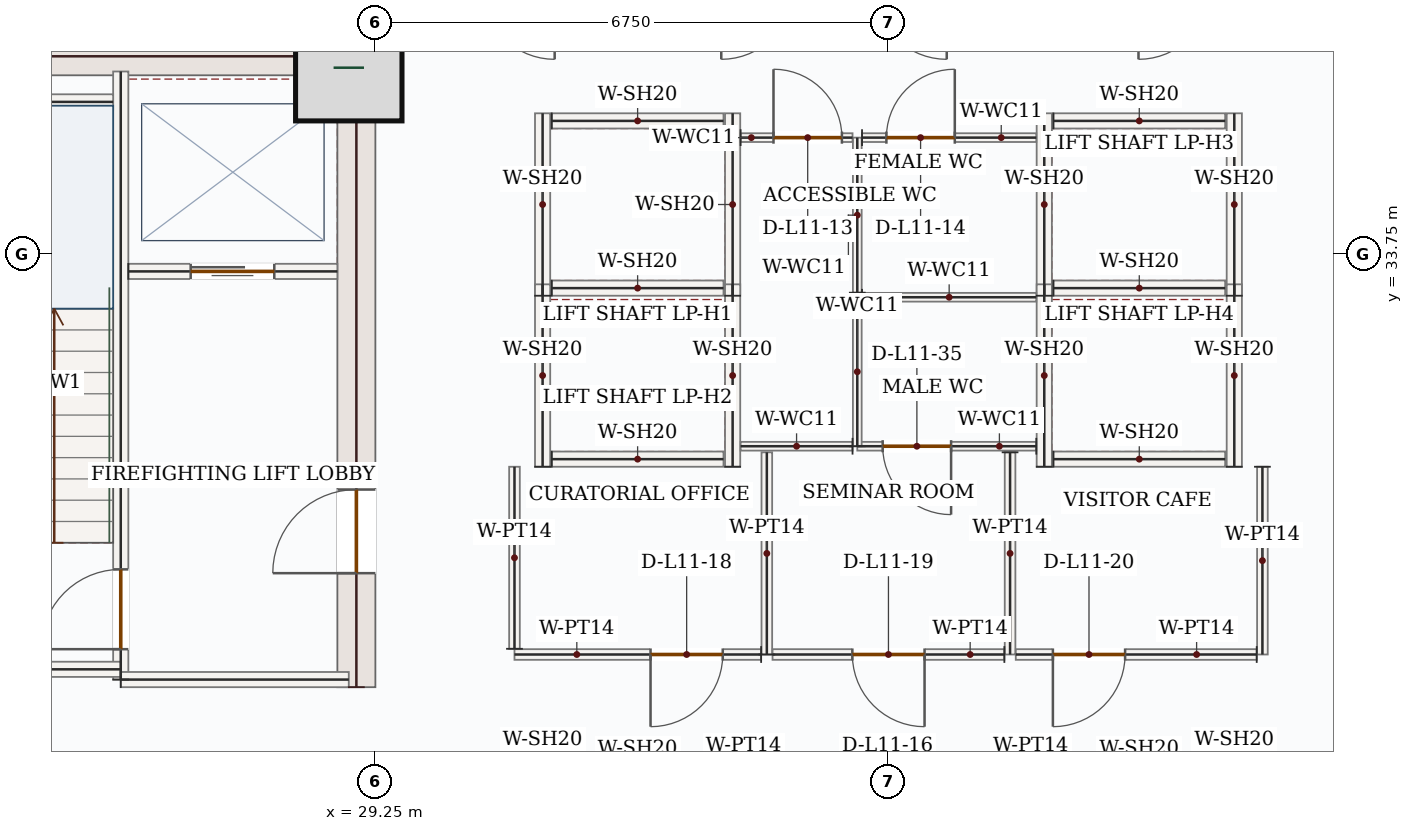
"""IFC4 building model, lengths in metres.
Left out: names, types, materials, properties, quantities, classifications, styles, units other than length and angle.
Written with IfcOpenShell. Run it as: python <this file> out.ifc"""

import sys

from ifc_helpers import new_model, si_unit, direction, frame, frame_2d, origin, origin_2d, place, context, subcontext, project, spatial, rectangle, extrude, source, transform, mapped, element, fill, save


model = new_model("IFC4")
c1 = context("Model", 3, precision=1e-05, world=origin(), true_north=direction((0.0, 1.0)))
c2 = subcontext(c1, "Body", "Model", "MODEL_VIEW")
j1 = project(units=[si_unit("LENGTHUNIT", "METRE"), si_unit("PLANEANGLEUNIT", "RADIAN")], contexts=[c1])
p1 = place(None, origin())
s1 = spatial("IfcSite", under=j1, at=p1, CompositionType="ELEMENT")
p2 = place(p1, origin())
s2 = spatial("IfcBuilding", under=s1, at=p2, CompositionType="ELEMENT")
p3 = place(p2, frame((0.0, 0.0, 54.3)))
s3 = spatial("IfcBuildingStorey", under=s2, at=p3, CompositionType="ELEMENT", Elevation=54.3)
p4 = place(p3, frame((29.0, 28.05, 0.0), z_axis=(0.0, 0.0, 1.0), x_axis=(0.0, 1.0, 0.0)))
e1 = element("IfcWall", 1, at=p4, inside=s3, PredefinedType="SHEAR", context=c2, shape_type="SweptSolid", body=[
    extrude(rectangle(XDim=8.55, YDim=0.5, at=frame_2d((4.275, 0.0))), origin(), (0.0, 0.0, 1.0), 3.95),
])
p5 = place(p4, frame((1.5, 0.0, 0.0)))
e2 = element("IfcOpeningElement", 2, at=p5, cuts=e1, PredefinedType="OPENING", context=c2, shape_type="SweptSolid", body=[
    extrude(rectangle(XDim=1.1, YDim=2.2, at=frame_2d((0.55, 1.1))), frame((0.0, 0.26, 0.0), z_axis=(0.0, -1.0, 0.0), x_axis=(1.0, 0.0, 0.0)), (0.0, 0.0, 1.0), 0.52),
])
m1 = source(origin(), c2, "Body", "SweptSolid", [
    extrude(rectangle(XDim=7.0, YDim=0.5, at=frame_2d((3.5, 0.0))), origin(), (0.0, 0.0, 1.0), 3.95),
])
p6 = place(p3, frame((21.75, 36.35, 0.0), z_axis=(0.0, 0.0, 1.0), x_axis=(1.0, 0.0, 0.0)))
e3 = element("IfcWall", 3, at=p6, inside=s3, PredefinedType="SHEAR", context=c2, shape_type="MappedRepresentation", body=[
    mapped(m1, transform((0.0, 0.0, 0.0), x_axis=(1.0, 0.0, 0.0), y_axis=(0.0, 1.0, 0.0), z_axis=(0.0, 0.0, 1.0), scale=1.0)),
])
m2 = source(origin(), c2, "Body", "SweptSolid", [
    extrude(rectangle(XDim=1.4, YDim=1.4, at=origin_2d()), origin(), (0.0, 0.0, 1.0), 4.2),
])
p7 = place(p3, frame((28.9, 36.2, 0.0), z_axis=(0.0, 0.0, 1.0), x_axis=(1.0, 0.0, 0.0)))
e4 = element("IfcColumn", 4, at=p7, inside=s3, PredefinedType="COLUMN", context=c2, shape_type="MappedRepresentation", body=[
    mapped(m2, transform((0.0, 0.0, 0.0), x_axis=(1.0, 0.0, 0.0), y_axis=(0.0, 1.0, 0.0), z_axis=(0.0, 0.0, 1.0), scale=1.0)),
])
p8 = place(p3, frame((25.9, 28.15, 0.0), z_axis=(0.0, 0.0, 1.0), x_axis=(0.0, 1.0, 0.0)))
e5 = element("IfcWall", 5, at=p8, inside=s3, PredefinedType="SOLIDWALL", context=c2, shape_type="SweptSolid", body=[
    extrude(rectangle(XDim=8.0, YDim=0.2, at=frame_2d((4.0, 0.0))), origin(), (0.0, 0.0, 1.0), 3.95),
])
p9 = place(p8, frame((0.4, 0.0, 0.0)))
e6 = element("IfcOpeningElement", 6, at=p9, cuts=e5, PredefinedType="OPENING", context=c2, shape_type="SweptSolid", body=[
    extrude(rectangle(XDim=1.05, YDim=2.15, at=frame_2d((0.525, 1.075))), frame((0.0, 0.11, 0.0), z_axis=(0.0, -1.0, 0.0), x_axis=(1.0, 0.0, 0.0)), (0.0, 0.0, 1.0), 0.22),
])
m3 = source(origin(), c2, "Body", "SweptSolid", [
    extrude(rectangle(XDim=4.25, YDim=0.2, at=frame_2d((2.125, 0.0))), origin(), (0.0, 0.0, 1.0), 3.95),
])
p10 = place(p3, frame((21.65, 28.285, 0.0), z_axis=(0.0, 0.0, 1.0), x_axis=(1.0, 0.0, 0.0)))
e7 = element("IfcWall", 7, at=p10, inside=s3, PredefinedType="SOLIDWALL", context=c2, shape_type="MappedRepresentation", body=[
    mapped(m3, transform((0.0, 0.0, 0.0), x_axis=(1.0, 0.0, 0.0), y_axis=(0.0, 1.0, 0.0), z_axis=(0.0, 0.0, 1.0), scale=1.0)),
])
m4 = source(origin(), c2, "Body", "SweptSolid", [
    extrude(rectangle(XDim=3.0, YDim=0.2, at=frame_2d((1.5, 0.0))), origin(), (0.0, 0.0, 1.0), 3.95),
])
p11 = place(p3, frame((25.9, 28.15, 0.0), z_axis=(0.0, 0.0, 1.0), x_axis=(1.0, 0.0, 0.0)))
e8 = element("IfcWall", 8, at=p11, inside=s3, PredefinedType="SOLIDWALL", context=c2, shape_type="MappedRepresentation", body=[
    mapped(m4, transform((0.0, 0.0, 0.0), x_axis=(1.0, 0.0, 0.0), y_axis=(0.0, 1.0, 0.0), z_axis=(0.0, 0.0, 1.0), scale=1.0)),
])
m5 = source(origin(), c2, "Body", "SweptSolid", [
    extrude(rectangle(XDim=3.25, YDim=0.2, at=frame_2d((1.625, 0.0))), origin(), (0.0, 0.0, 1.0), 3.95),
])
p12 = place(p3, frame((22.55, 35.75, 0.0), z_axis=(0.0, 0.0, 1.0), x_axis=(1.0, 0.0, 0.0)))
e9 = element("IfcWall", 9, at=p12, inside=s3, PredefinedType="SOLIDWALL", context=c2, shape_type="MappedRepresentation", body=[
    mapped(m5, transform((0.0, 0.0, 0.0), x_axis=(1.0, 0.0, 0.0), y_axis=(0.0, 1.0, 0.0), z_axis=(0.0, 0.0, 1.0), scale=1.0)),
])
p13 = place(p3, frame((26.0, 33.52, 0.0), z_axis=(0.0, 0.0, 1.0), x_axis=(1.0, 0.0, 0.0)))
e10 = element("IfcWall", 10, at=p13, inside=s3, PredefinedType="SOLIDWALL", context=c2, shape_type="SweptSolid", body=[
    extrude(rectangle(XDim=2.75, YDim=0.2, at=frame_2d((1.375, 0.0))), origin(), (0.0, 0.0, 1.0), 3.95),
])
p14 = place(p13, frame((0.82, 0.0, 0.0)))
e11 = element("IfcOpeningElement", 11, at=p14, cuts=e10, PredefinedType="OPENING", context=c2, shape_type="SweptSolid", body=[
    extrude(rectangle(XDim=1.1, YDim=2.15, at=frame_2d((0.55, 1.075))), frame((0.0, 0.11, 0.0), z_axis=(0.0, -1.0, 0.0), x_axis=(1.0, 0.0, 0.0)), (0.0, 0.0, 1.0), 0.22),
])
m6 = source(origin(), c2, "Body", "SweptSolid", [
    extrude(rectangle(XDim=2.4, YDim=0.2, at=frame_2d((1.2, 0.0))), origin(), (0.0, 0.0, 1.0), 3.95),
])
for number, where, z_axis, x_axis in (
    (12, (31.45, 33.2, 0.0), (0.0, 0.0, 1.0), (0.0, 1.0, 0.0)),
    (13, (33.95, 33.2, 0.0), (0.0, 0.0, 1.0), (0.0, 1.0, 0.0)),
):
    element("IfcWall", number, at=place(p3, frame(where, z_axis=z_axis, x_axis=x_axis)), inside=s3, PredefinedType="SOLIDWALL", context=c2, shape_type="MappedRepresentation", body=[
        mapped(m6, transform((0.0, 0.0, 0.0), x_axis=(1.0, 0.0, 0.0), y_axis=(0.0, 1.0, 0.0), z_axis=(0.0, 0.0, 1.0), scale=1.0)),
    ])
m7 = source(origin(), c2, "Body", "SweptSolid", [
    extrude(rectangle(XDim=2.26, YDim=0.2, at=frame_2d((1.13, 0.0))), origin(), (0.0, 0.0, 1.0), 3.95),
])
for number, where, z_axis, x_axis in (
    (14, (31.57, 33.3, 0.0), (0.0, 0.0, 1.0), (1.0, 0.0, 0.0)),
    (15, (31.57, 35.5, 0.0), (0.0, 0.0, 1.0), (1.0, 0.0, 0.0)),
):
    element("IfcWall", number, at=place(p3, frame(where, z_axis=z_axis, x_axis=x_axis)), inside=s3, PredefinedType="SOLIDWALL", context=c2, shape_type="MappedRepresentation", body=[
        mapped(m7, transform((0.0, 0.0, 0.0), x_axis=(1.0, 0.0, 0.0), y_axis=(0.0, 1.0, 0.0), z_axis=(0.0, 0.0, 1.0), scale=1.0)),
    ])
for number, where, z_axis, x_axis in (
    (16, (31.45, 30.95, 0.0), (0.0, 0.0, 1.0), (0.0, 1.0, 0.0)),
    (17, (33.95, 30.95, 0.0), (0.0, 0.0, 1.0), (0.0, 1.0, 0.0)),
):
    element("IfcWall", number, at=place(p3, frame(where, z_axis=z_axis, x_axis=x_axis)), inside=s3, PredefinedType="SOLIDWALL", context=c2, shape_type="MappedRepresentation", body=[
        mapped(m6, transform((0.0, 0.0, 0.0), x_axis=(1.0, 0.0, 0.0), y_axis=(0.0, 1.0, 0.0), z_axis=(0.0, 0.0, 1.0), scale=1.0)),
    ])
p15 = place(p3, frame((31.57, 31.05, 0.0), z_axis=(0.0, 0.0, 1.0), x_axis=(1.0, 0.0, 0.0)))
e18 = element("IfcWall", 18, at=p15, inside=s3, PredefinedType="SOLIDWALL", context=c2, shape_type="MappedRepresentation", body=[
    mapped(m7, transform((0.0, 0.0, 0.0), x_axis=(1.0, 0.0, 0.0), y_axis=(0.0, 1.0, 0.0), z_axis=(0.0, 0.0, 1.0), scale=1.0)),
])
for number, where, z_axis, x_axis in (
    (19, (38.05, 33.2, 0.0), (0.0, 0.0, 1.0), (0.0, 1.0, 0.0)),
    (20, (40.55, 33.2, 0.0), (0.0, 0.0, 1.0), (0.0, 1.0, 0.0)),
):
    element("IfcWall", number, at=place(p3, frame(where, z_axis=z_axis, x_axis=x_axis)), inside=s3, PredefinedType="SOLIDWALL", context=c2, shape_type="MappedRepresentation", body=[
        mapped(m6, transform((0.0, 0.0, 0.0), x_axis=(1.0, 0.0, 0.0), y_axis=(0.0, 1.0, 0.0), z_axis=(0.0, 0.0, 1.0), scale=1.0)),
    ])
for number, where, z_axis, x_axis in (
    (21, (38.17, 33.3, 0.0), (0.0, 0.0, 1.0), (1.0, 0.0, 0.0)),
    (22, (38.17, 35.5, 0.0), (0.0, 0.0, 1.0), (1.0, 0.0, 0.0)),
):
    element("IfcWall", number, at=place(p3, frame(where, z_axis=z_axis, x_axis=x_axis)), inside=s3, PredefinedType="SOLIDWALL", context=c2, shape_type="MappedRepresentation", body=[
        mapped(m7, transform((0.0, 0.0, 0.0), x_axis=(1.0, 0.0, 0.0), y_axis=(0.0, 1.0, 0.0), z_axis=(0.0, 0.0, 1.0), scale=1.0)),
    ])
for number, where, z_axis, x_axis in (
    (23, (38.05, 30.95, 0.0), (0.0, 0.0, 1.0), (0.0, 1.0, 0.0)),
    (24, (40.55, 30.95, 0.0), (0.0, 0.0, 1.0), (0.0, 1.0, 0.0)),
):
    element("IfcWall", number, at=place(p3, frame(where, z_axis=z_axis, x_axis=x_axis)), inside=s3, PredefinedType="SOLIDWALL", context=c2, shape_type="MappedRepresentation", body=[
        mapped(m6, transform((0.0, 0.0, 0.0), x_axis=(1.0, 0.0, 0.0), y_axis=(0.0, 1.0, 0.0), z_axis=(0.0, 0.0, 1.0), scale=1.0)),
    ])
p16 = place(p3, frame((38.17, 31.05, 0.0), z_axis=(0.0, 0.0, 1.0), x_axis=(1.0, 0.0, 0.0)))
e25 = element("IfcWall", 25, at=p16, inside=s3, PredefinedType="SOLIDWALL", context=c2, shape_type="MappedRepresentation", body=[
    mapped(m7, transform((0.0, 0.0, 0.0), x_axis=(1.0, 0.0, 0.0), y_axis=(0.0, 1.0, 0.0), z_axis=(0.0, 0.0, 1.0), scale=1.0)),
])
p17 = place(p3, frame((37.945, 31.22, 0.0), z_axis=(0.0, 0.0, 1.0), x_axis=(-1.0, 0.0, 0.0)))
e26 = element("IfcWall", 26, at=p17, inside=s3, PredefinedType="PARTITIONING", context=c2, shape_type="SweptSolid", body=[
    extrude(rectangle(XDim=2.355, YDim=0.115, at=frame_2d((1.177, 0.0))), origin(), (0.0, 0.0, 1.0), 3.95),
])
p18 = place(p17, frame((1.121, 0.0, 0.0)))
e27 = element("IfcOpeningElement", 27, at=p18, cuts=e26, PredefinedType="OPENING", context=c2, shape_type="SweptSolid", body=[
    extrude(rectangle(XDim=0.9, YDim=2.1, at=frame_2d((0.45, 1.05))), frame((0.0, 0.067, 0.0), z_axis=(0.0, -1.0, 0.0), x_axis=(1.0, 0.0, 0.0)), (0.0, 0.0, 1.0), 0.135),
])
m8 = source(origin(), c2, "Body", "SweptSolid", [
    extrude(rectangle(XDim=1.96, YDim=0.115, at=frame_2d((0.98, 0.0))), origin(), (0.0, 0.0, 1.0), 3.95),
])
p19 = place(p3, frame((35.59, 31.22, 0.0), z_axis=(0.0, 0.0, 1.0), x_axis=(0.0, 1.0, 0.0)))
e28 = element("IfcWall", 28, at=p19, inside=s3, PredefinedType="PARTITIONING", context=c2, shape_type="MappedRepresentation", body=[
    mapped(m8, transform((0.0, 0.0, 0.0), x_axis=(1.0, 0.0, 0.0), y_axis=(0.0, 1.0, 0.0), z_axis=(0.0, 0.0, 1.0), scale=1.0)),
])
m9 = source(origin(), c2, "Body", "SweptSolid", [
    extrude(rectangle(XDim=2.292, YDim=0.115, at=frame_2d((1.146, 0.0))), origin(), (0.0, 0.0, 1.0), 3.95),
])
p20 = place(p3, frame((35.653, 33.18, 0.0), z_axis=(0.0, 0.0, 1.0), x_axis=(1.0, 0.0, 0.0)))
e29 = element("IfcWall", 29, at=p20, inside=s3, PredefinedType="PARTITIONING", context=c2, shape_type="MappedRepresentation", body=[
    mapped(m9, transform((0.0, 0.0, 0.0), x_axis=(1.0, 0.0, 0.0), y_axis=(0.0, 1.0, 0.0), z_axis=(0.0, 0.0, 1.0), scale=1.0)),
])
m10 = source(origin(), c2, "Body", "SweptSolid", [
    extrude(rectangle(XDim=2.04, YDim=0.115, at=frame_2d((1.02, 0.0))), origin(), (0.0, 0.0, 1.0), 3.95),
])
p21 = place(p3, frame((35.59, 33.24, 0.0), z_axis=(0.0, 0.0, 1.0), x_axis=(0.0, 1.0, 0.0)))
e30 = element("IfcWall", 30, at=p21, inside=s3, PredefinedType="PARTITIONING", context=c2, shape_type="MappedRepresentation", body=[
    mapped(m10, transform((0.0, 0.0, 0.0), x_axis=(1.0, 0.0, 0.0), y_axis=(0.0, 1.0, 0.0), z_axis=(0.0, 0.0, 1.0), scale=1.0)),
])
p22 = place(p3, frame((35.653, 35.28, 0.0), z_axis=(0.0, 0.0, 1.0), x_axis=(1.0, 0.0, 0.0)))
e31 = element("IfcWall", 31, at=p22, inside=s3, PredefinedType="PARTITIONING", context=c2, shape_type="SweptSolid", body=[
    extrude(rectangle(XDim=2.292, YDim=0.115, at=frame_2d((1.146, 0.0))), origin(), (0.0, 0.0, 1.0), 3.95),
])
p23 = place(p22, frame((0.32, 0.0, 0.0)))
e32 = element("IfcOpeningElement", 32, at=p23, cuts=e31, PredefinedType="OPENING", context=c2, shape_type="SweptSolid", body=[
    extrude(rectangle(XDim=0.9, YDim=2.1, at=frame_2d((0.45, 1.05))), frame((0.0, 0.067, 0.0), z_axis=(0.0, -1.0, 0.0), x_axis=(1.0, 0.0, 0.0)), (0.0, 0.0, 1.0), 0.135),
])
m11 = source(origin(), c2, "Body", "SweptSolid", [
    extrude(rectangle(XDim=1.473, YDim=0.115, at=frame_2d((0.736, 0.0))), origin(), (0.0, 0.0, 1.0), 3.95),
])
p24 = place(p3, frame((35.528, 31.22, 0.0), z_axis=(0.0, 0.0, 1.0), x_axis=(-1.0, 0.0, 0.0)))
e33 = element("IfcWall", 33, at=p24, inside=s3, PredefinedType="PARTITIONING", context=c2, shape_type="MappedRepresentation", body=[
    mapped(m11, transform((0.0, 0.0, 0.0), x_axis=(1.0, 0.0, 0.0), y_axis=(0.0, 1.0, 0.0), z_axis=(0.0, 0.0, 1.0), scale=1.0)),
])
p25 = place(p3, frame((34.055, 35.28, 0.0), z_axis=(0.0, 0.0, 1.0), x_axis=(1.0, 0.0, 0.0)))
e34 = element("IfcWall", 34, at=p25, inside=s3, PredefinedType="PARTITIONING", context=c2, shape_type="SweptSolid", body=[
    extrude(rectangle(XDim=1.473, YDim=0.115, at=frame_2d((0.736, 0.0))), origin(), (0.0, 0.0, 1.0), 3.95),
])
p26 = place(p25, frame((0.433, 0.0, 0.0)))
e35 = element("IfcOpeningElement", 35, at=p26, cuts=e34, PredefinedType="OPENING", context=c2, shape_type="SweptSolid", body=[
    extrude(rectangle(XDim=0.9, YDim=2.1, at=frame_2d((0.45, 1.05))), frame((0.0, 0.067, 0.0), z_axis=(0.0, -1.0, 0.0), x_axis=(1.0, 0.0, 0.0)), (0.0, 0.0, 1.0), 0.135),
])
m12 = source(origin(), c2, "Body", "SweptSolid", [
    extrude(rectangle(XDim=2.66, YDim=0.14, at=frame_2d((1.33, 0.0))), origin(), (0.0, 0.0, 1.0), 3.95),
])
for number, where, z_axis, x_axis in (
    (36, (34.4, 28.48, 0.0), (0.0, 0.0, 1.0), (0.0, 1.0, 0.0)),
    (37, (37.6, 31.14, 0.0), (0.0, 0.0, 1.0), (0.0, -1.0, 0.0)),
):
    element("IfcWall", number, at=place(p3, frame(where, z_axis=z_axis, x_axis=x_axis)), inside=s3, PredefinedType="PARTITIONING", context=c2, shape_type="MappedRepresentation", body=[
        mapped(m12, transform((0.0, 0.0, 0.0), x_axis=(1.0, 0.0, 0.0), y_axis=(0.0, 1.0, 0.0), z_axis=(0.0, 0.0, 1.0), scale=1.0)),
    ])
p27 = place(p3, frame((37.525, 28.48, 0.0), z_axis=(0.0, 0.0, 1.0), x_axis=(-1.0, 0.0, 0.0)))
e38 = element("IfcWall", 38, at=p27, inside=s3, PredefinedType="PARTITIONING", context=c2, shape_type="SweptSolid", body=[
    extrude(rectangle(XDim=3.05, YDim=0.14, at=frame_2d((1.525, 0.0))), origin(), (0.0, 0.0, 1.0), 3.95),
])
p28 = place(p27, frame((1.05, 0.0, 0.0)))
e39 = element("IfcOpeningElement", 39, at=p28, cuts=e38, PredefinedType="OPENING", context=c2, shape_type="SweptSolid", body=[
    extrude(rectangle(XDim=0.95, YDim=2.15, at=frame_2d((0.475, 1.075))), frame((0.0, 0.08, 0.0), z_axis=(0.0, -1.0, 0.0), x_axis=(1.0, 0.0, 0.0)), (0.0, 0.0, 1.0), 0.16),
])
p29 = place(p3, frame((34.325, 28.48, 0.0), z_axis=(0.0, 0.0, 1.0), x_axis=(-1.0, 0.0, 0.0)))
e40 = element("IfcWall", 40, at=p29, inside=s3, PredefinedType="PARTITIONING", context=c2, shape_type="SweptSolid", body=[
    extrude(rectangle(XDim=3.245, YDim=0.14, at=frame_2d((1.623, 0.0))), origin(), (0.0, 0.0, 1.0), 3.95),
])
p30 = place(p29, frame((0.505, 0.0, 0.0)))
e41 = element("IfcOpeningElement", 41, at=p30, cuts=e40, PredefinedType="OPENING", context=c2, shape_type="SweptSolid", body=[
    extrude(rectangle(XDim=0.95, YDim=2.15, at=frame_2d((0.475, 1.075))), frame((0.0, 0.08, 0.0), z_axis=(0.0, -1.0, 0.0), x_axis=(1.0, 0.0, 0.0)), (0.0, 0.0, 1.0), 0.16),
])
m13 = source(origin(), c2, "Body", "SweptSolid", [
    extrude(rectangle(XDim=2.395, YDim=0.14, at=frame_2d((1.198, 0.0))), origin(), (0.0, 0.0, 1.0), 3.95),
])
p31 = place(p3, frame((31.08, 28.555, 0.0), z_axis=(0.0, 0.0, 1.0), x_axis=(0.0, 1.0, 0.0)))
e42 = element("IfcWall", 42, at=p31, inside=s3, PredefinedType="PARTITIONING", context=c2, shape_type="MappedRepresentation", body=[
    mapped(m13, transform((0.0, 0.0, 0.0), x_axis=(1.0, 0.0, 0.0), y_axis=(0.0, 1.0, 0.0), z_axis=(0.0, 0.0, 1.0), scale=1.0)),
])
m14 = source(origin(), c2, "Body", "SweptSolid", [
    extrude(rectangle(XDim=2.47, YDim=0.14, at=frame_2d((1.235, 0.0))), origin(), (0.0, 0.0, 1.0), 3.95),
])
p32 = place(p3, frame((40.92, 30.95, 0.0), z_axis=(0.0, 0.0, 1.0), x_axis=(0.0, -1.0, 0.0)))
e43 = element("IfcWall", 43, at=p32, inside=s3, PredefinedType="PARTITIONING", context=c2, shape_type="MappedRepresentation", body=[
    mapped(m14, transform((0.0, 0.0, 0.0), x_axis=(1.0, 0.0, 0.0), y_axis=(0.0, 1.0, 0.0), z_axis=(0.0, 0.0, 1.0), scale=1.0)),
])
p33 = place(p3, frame((40.845, 28.48, 0.0), z_axis=(0.0, 0.0, 1.0), x_axis=(-1.0, 0.0, 0.0)))
e44 = element("IfcWall", 44, at=p33, inside=s3, PredefinedType="PARTITIONING", context=c2, shape_type="SweptSolid", body=[
    extrude(rectangle(XDim=3.17, YDim=0.14, at=frame_2d((1.585, 0.0))), origin(), (0.0, 0.0, 1.0), 3.95),
])
p34 = place(p33, frame((1.732, 0.0, 0.0)))
e45 = element("IfcOpeningElement", 45, at=p34, cuts=e44, PredefinedType="OPENING", context=c2, shape_type="SweptSolid", body=[
    extrude(rectangle(XDim=0.95, YDim=2.15, at=frame_2d((0.475, 1.075))), frame((0.0, 0.08, 0.0), z_axis=(0.0, -1.0, 0.0), x_axis=(1.0, 0.0, 0.0)), (0.0, 0.0, 1.0), 0.16),
])
m15 = source(origin(), c2, "Body", "SweptSolid", [
    extrude(rectangle(XDim=1.05, YDim=2.15, at=frame_2d((0.525, 1.075))), frame((0.0, 0.025, 0.0), z_axis=(0.0, -1.0, 0.0), x_axis=(1.0, 0.0, 0.0)), (0.0, 0.0, 1.0), 0.05),
])
p35 = place(p9, origin())
e46 = element("IfcDoor", 46, at=p35, inside=s3, OperationType="SINGLE_SWING_LEFT", PredefinedType="DOOR", context=c2, shape_type="MappedRepresentation", body=[
    mapped(m15, transform((0.0, 0.0, 0.0), x_axis=(1.0, 0.0, 0.0), y_axis=(0.0, 1.0, 0.0), z_axis=(0.0, 0.0, 1.0), scale=1.0)),
])
fill(e6, e46)
m16 = source(origin(), c2, "Body", "SweptSolid", [
    extrude(rectangle(XDim=1.1, YDim=2.15, at=frame_2d((0.55, 1.075))), frame((0.0, 0.025, 0.0), z_axis=(0.0, -1.0, 0.0), x_axis=(1.0, 0.0, 0.0)), (0.0, 0.0, 1.0), 0.05),
])
p36 = place(p14, origin())
e47 = element("IfcDoor", 47, at=p36, inside=s3, OperationType="DOUBLE_DOOR_SLIDING", PredefinedType="DOOR", context=c2, shape_type="MappedRepresentation", body=[
    mapped(m16, transform((0.0, 0.0, 0.0), x_axis=(1.0, 0.0, 0.0), y_axis=(0.0, 1.0, 0.0), z_axis=(0.0, 0.0, 1.0), scale=1.0)),
])
fill(e11, e47)
m17 = source(origin(), c2, "Body", "SweptSolid", [
    extrude(rectangle(XDim=1.1, YDim=2.2, at=frame_2d((0.55, 1.1))), frame((0.0, 0.025, 0.0), z_axis=(0.0, -1.0, 0.0), x_axis=(1.0, 0.0, 0.0)), (0.0, 0.0, 1.0), 0.05),
])
p37 = place(p5, origin())
e48 = element("IfcDoor", 48, at=p37, inside=s3, OperationType="SINGLE_SWING_LEFT", PredefinedType="DOOR", context=c2, shape_type="MappedRepresentation", body=[
    mapped(m17, transform((0.0, 0.0, 0.0), x_axis=(1.0, 0.0, 0.0), y_axis=(0.0, 1.0, 0.0), z_axis=(0.0, 0.0, 1.0), scale=1.0)),
])
fill(e2, e48)
m18 = source(origin(), c2, "Body", "SweptSolid", [
    extrude(rectangle(XDim=0.9, YDim=2.1, at=frame_2d((0.45, 1.05))), frame((0.0, 0.025, 0.0), z_axis=(0.0, -1.0, 0.0), x_axis=(1.0, 0.0, 0.0)), (0.0, 0.0, 1.0), 0.05),
])
p38 = place(p26, origin())
e49 = element("IfcDoor", 49, at=p38, inside=s3, OperationType="SINGLE_SWING_LEFT", PredefinedType="DOOR", context=c2, shape_type="MappedRepresentation", body=[
    mapped(m18, transform((0.0, 0.0, 0.0), x_axis=(1.0, 0.0, 0.0), y_axis=(0.0, 1.0, 0.0), z_axis=(0.0, 0.0, 1.0), scale=1.0)),
])
fill(e35, e49)
p39 = place(p23, origin())
e50 = element("IfcDoor", 50, at=p39, inside=s3, OperationType="SINGLE_SWING_RIGHT", PredefinedType="DOOR", context=c2, shape_type="MappedRepresentation", body=[
    mapped(m18, transform((0.0, 0.0, 0.0), x_axis=(1.0, 0.0, 0.0), y_axis=(0.0, 1.0, 0.0), z_axis=(0.0, 0.0, 1.0), scale=1.0)),
])
fill(e32, e50)
m19 = source(origin(), c2, "Body", "SweptSolid", [
    extrude(rectangle(XDim=0.95, YDim=2.15, at=frame_2d((0.475, 1.075))), frame((0.0, 0.025, 0.0), z_axis=(0.0, -1.0, 0.0), x_axis=(1.0, 0.0, 0.0)), (0.0, 0.0, 1.0), 0.05),
])
p40 = place(p30, origin())
e51 = element("IfcDoor", 51, at=p40, inside=s3, OperationType="SINGLE_SWING_RIGHT", PredefinedType="DOOR", context=c2, shape_type="MappedRepresentation", body=[
    mapped(m19, transform((0.0, 0.0, 0.0), x_axis=(1.0, 0.0, 0.0), y_axis=(0.0, 1.0, 0.0), z_axis=(0.0, 0.0, 1.0), scale=1.0)),
])
fill(e41, e51)
p41 = place(p28, origin())
e52 = element("IfcDoor", 52, at=p41, inside=s3, OperationType="SINGLE_SWING_LEFT", PredefinedType="DOOR", context=c2, shape_type="MappedRepresentation", body=[
    mapped(m19, transform((0.0, 0.0, 0.0), x_axis=(1.0, 0.0, 0.0), y_axis=(0.0, 1.0, 0.0), z_axis=(0.0, 0.0, 1.0), scale=1.0)),
])
fill(e39, e52)
p42 = place(p34, origin())
e53 = element("IfcDoor", 53, at=p42, inside=s3, OperationType="SINGLE_SWING_RIGHT", PredefinedType="DOOR", context=c2, shape_type="MappedRepresentation", body=[
    mapped(m19, transform((0.0, 0.0, 0.0), x_axis=(1.0, 0.0, 0.0), y_axis=(0.0, 1.0, 0.0), z_axis=(0.0, 0.0, 1.0), scale=1.0)),
])
fill(e45, e53)
p43 = place(p18, origin())
e54 = element("IfcDoor", 54, at=p43, inside=s3, OperationType="SINGLE_SWING_LEFT", PredefinedType="DOOR", context=c2, shape_type="MappedRepresentation", body=[
    mapped(m18, transform((0.0, 0.0, 0.0), x_axis=(1.0, 0.0, 0.0), y_axis=(0.0, 1.0, 0.0), z_axis=(0.0, 0.0, 1.0), scale=1.0)),
])
fill(e27, e54)
save(model, sys.argv[1])
